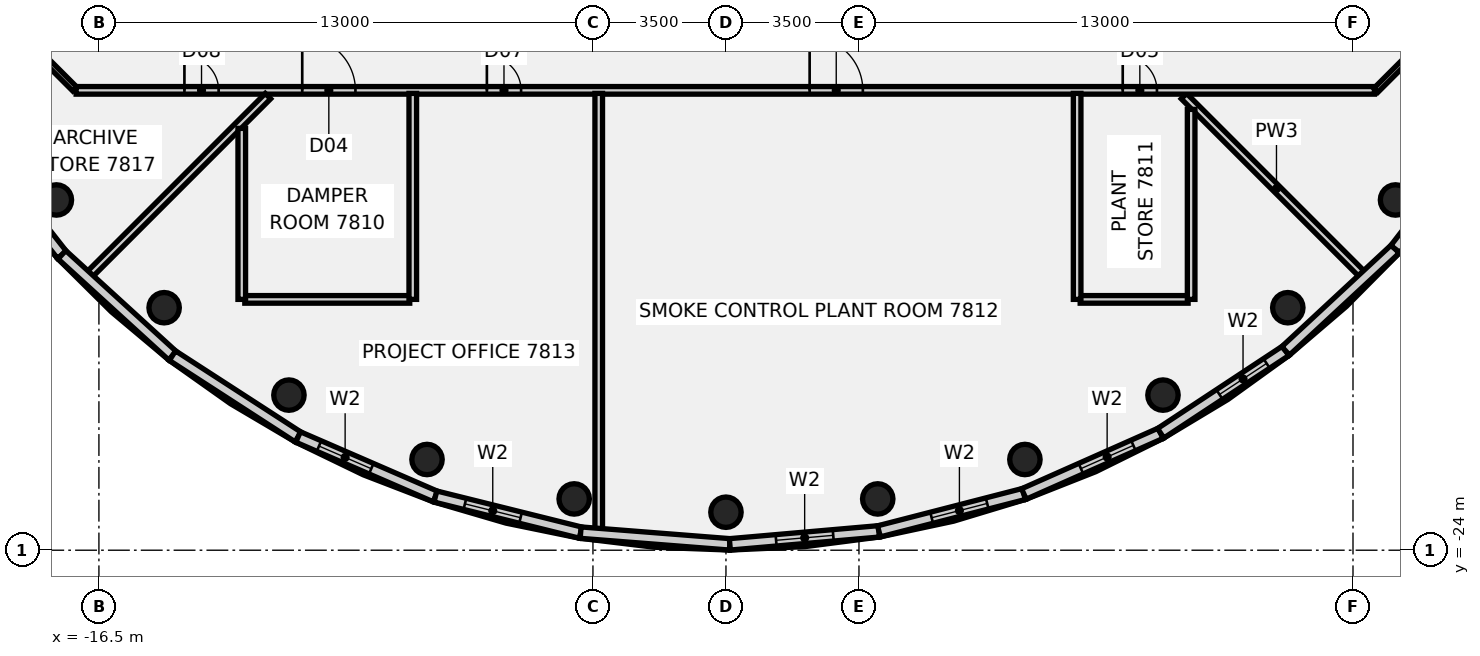
"""IFC4 building model, lengths in metres.
Left out: names, types, materials, properties, quantities, classifications, styles, units other than length and angle.
Written with IfcOpenShell. Run it as: python <this file> out.ifc"""

import sys

from ifc_helpers import new_model, si_unit, direction, frame, frame_2d, origin, origin_2d, place, context, subcontext, project, spatial, rectangle, circle, extrude, element, fill, save


model = new_model("IFC4")
c1 = context("Model", 3, precision=1e-05, world=origin(), true_north=direction((0.0, 1.0)))
c2 = subcontext(c1, "Body", "Model", "MODEL_VIEW")
j1 = project(units=[si_unit("LENGTHUNIT", "METRE"), si_unit("PLANEANGLEUNIT", "RADIAN")], contexts=[c1])
p1 = place(None, origin())
s1 = spatial("IfcSite", under=j1, at=p1, CompositionType="ELEMENT")
p2 = place(p1, origin())
s2 = spatial("IfcBuilding", under=s1, at=p2, CompositionType="ELEMENT")
p3 = place(p2, frame((0.0, 0.0, 317.4)))
s3 = spatial("IfcBuildingStorey", under=s2, at=p3, CompositionType="ELEMENT", Elevation=317.4)
for number, where, z_axis, x_axis in (
    (1, (-17.619, -14.784, -0.18), (0.0, 0.0, 1.0), (1.0, 0.0, 0.0)),
    (2, (-14.784, -17.619, -0.18), (0.0, 0.0, 1.0), (1.0, 0.0, 0.0)),
    (3, (-11.5, -19.919, -0.18), (0.0, 0.0, 1.0), (1.0, 0.0, 0.0)),
    (4, (-7.866, -21.613, -0.18), (0.0, 0.0, 1.0), (1.0, 0.0, 0.0)),
    (5, (-3.994, -22.651, -0.18), (0.0, 0.0, 1.0), (1.0, 0.0, 0.0)),
    (6, (0.0, -23.0, -0.18), (0.0, 0.0, 1.0), (1.0, 0.0, 0.0)),
    (7, (3.994, -22.651, -0.18), (0.0, 0.0, 1.0), (1.0, 0.0, 0.0)),
    (8, (7.866, -21.613, -0.18), (0.0, 0.0, 1.0), (1.0, 0.0, 0.0)),
    (9, (11.5, -19.919, -0.18), (0.0, 0.0, 1.0), (1.0, 0.0, 0.0)),
    (10, (14.784, -17.619, -0.18), (0.0, 0.0, 1.0), (1.0, 0.0, 0.0)),
    (11, (17.619, -14.784, -0.18), (0.0, 0.0, 1.0), (1.0, 0.0, 0.0)),
):
    element("IfcColumn", number, at=place(p3, frame(where, z_axis=z_axis, x_axis=x_axis)), inside=s3, PredefinedType="COLUMN", context=c2, shape_type="SweptSolid", body=[
        extrude(circle(Radius=0.4, at=origin_2d()), origin(), (0.0, 0.0, 1.0), 4.0),
    ])
p4 = place(p3, frame((-18.872, -10.128, 0.0), z_axis=(0.0, 0.0, 1.0), x_axis=(0.707106781187, -0.707106781187, 0.0)))
e12 = element("IfcWall", 12, at=p4, inside=s3, PredefinedType="PARTITIONING", context=c2, shape_type="SweptSolid", body=[
    extrude(rectangle(XDim=2.455, YDim=0.15, at=frame_2d((1.228, 0.0))), origin(), (0.0, 0.0, 1.0), 3.22),
])
p5 = place(p3, frame((12.052, -12.052, 0.0), z_axis=(0.0, 0.0, 1.0), x_axis=(0.707106781187, -0.707106781187, 0.0)))
e13 = element("IfcWall", 13, at=p5, inside=s3, PredefinedType="PARTITIONING", context=c2, shape_type="SweptSolid", body=[
    extrude(rectangle(XDim=6.886, YDim=0.2, at=frame_2d((3.443, 0.0))), origin(), (0.0, 0.0, 1.0), 3.22),
])
p6 = place(p3, frame((-17.1, -11.9, 0.0), z_axis=(0.0, 0.0, 1.0), x_axis=(1.0, 0.0, 0.0)))
e14 = element("IfcWall", 14, at=p6, inside=s3, PredefinedType="PARTITIONING", context=c2, shape_type="SweptSolid", body=[
    extrude(rectangle(XDim=34.165, YDim=0.2, at=frame_2d((17.083, 0.0))), origin(), (0.0, 0.0, 1.0), 3.22),
])
p7 = place(p6, frame((5.95, 0.0, 0.0)))
e15 = element("IfcOpeningElement", 15, at=p7, cuts=e14, PredefinedType="OPENING", context=c2, shape_type="SweptSolid", body=[
    extrude(rectangle(XDim=1.4, YDim=2.1, at=frame_2d((0.7, 1.05))), frame((0.0, 0.11, 0.0), z_axis=(0.0, -1.0, 0.0), x_axis=(1.0, 0.0, 0.0)), (0.0, 0.0, 1.0), 0.22),
])
p8 = place(p6, frame((27.541, 0.0, 0.0)))
e16 = element("IfcOpeningElement", 16, at=p8, cuts=e14, PredefinedType="OPENING", context=c2, shape_type="SweptSolid", body=[
    extrude(rectangle(XDim=0.9, YDim=2.1, at=frame_2d((0.45, 1.05))), frame((0.0, 0.11, 0.0), z_axis=(0.0, -1.0, 0.0), x_axis=(1.0, 0.0, 0.0)), (0.0, 0.0, 1.0), 0.22),
])
p9 = place(p6, frame((19.302, 0.0, 0.0)))
e17 = element("IfcOpeningElement", 17, at=p9, cuts=e14, PredefinedType="OPENING", context=c2, shape_type="SweptSolid", body=[
    extrude(rectangle(XDim=1.4, YDim=2.1, at=frame_2d((0.7, 1.05))), frame((0.0, 0.11, 0.0), z_axis=(0.0, -1.0, 0.0), x_axis=(1.0, 0.0, 0.0)), (0.0, 0.0, 1.0), 0.22),
])
p10 = place(p6, frame((10.809, 0.0, 0.0)))
e18 = element("IfcOpeningElement", 18, at=p10, cuts=e14, PredefinedType="OPENING", context=c2, shape_type="SweptSolid", body=[
    extrude(rectangle(XDim=0.9, YDim=2.1, at=frame_2d((0.45, 1.05))), frame((0.0, 0.11, 0.0), z_axis=(0.0, -1.0, 0.0), x_axis=(1.0, 0.0, 0.0)), (0.0, 0.0, 1.0), 0.22),
])
p11 = place(p6, frame((2.85, 0.0, 0.0)))
e19 = element("IfcOpeningElement", 19, at=p11, cuts=e14, PredefinedType="OPENING", context=c2, shape_type="SweptSolid", body=[
    extrude(rectangle(XDim=0.9, YDim=2.1, at=frame_2d((0.45, 1.05))), frame((0.0, 0.11, 0.0), z_axis=(0.0, -1.0, 0.0), x_axis=(1.0, 0.0, 0.0)), (0.0, 0.0, 1.0), 0.22),
])
p12 = place(p3, frame((-12.661, -17.4, 0.0), z_axis=(0.0, 0.0, 1.0), x_axis=(1.0, 0.0, 0.0)))
e20 = element("IfcWall", 20, at=p12, inside=s3, PredefinedType="PARTITIONING", context=c2, shape_type="SweptSolid", body=[
    extrude(rectangle(XDim=4.34, YDim=0.2, at=frame_2d((2.17, 0.0))), origin(), (0.0, 0.0, 1.0), 3.22),
])
p13 = place(p3, frame((9.321, -17.4, 0.0), z_axis=(0.0, 0.0, 1.0), x_axis=(1.0, 0.0, 0.0)))
e21 = element("IfcWall", 21, at=p13, inside=s3, PredefinedType="PARTITIONING", context=c2, shape_type="SweptSolid", body=[
    extrude(rectangle(XDim=2.84, YDim=0.2, at=frame_2d((1.42, 0.0))), origin(), (0.0, 0.0, 1.0), 3.22),
])
p14 = place(p3, frame((-16.927, -16.927, 0.0), z_axis=(0.0, 0.0, 1.0), x_axis=(0.707106781187, 0.707106781187, 0.0)))
e22 = element("IfcWall", 22, at=p14, inside=s3, PredefinedType="PARTITIONING", context=c2, shape_type="SweptSolid", body=[
    extrude(rectangle(XDim=6.894, YDim=0.2, at=frame_2d((3.447, 0.0))), origin(), (0.0, 0.0, 1.0), 3.22),
])
p15 = place(p3, frame((17.1, -11.9, 0.0), z_axis=(0.0, 0.0, 1.0), x_axis=(0.707106781187, 0.707106781187, 0.0)))
e23 = element("IfcWall", 23, at=p15, inside=s3, PredefinedType="PARTITIONING", context=c2, shape_type="SweptSolid", body=[
    extrude(rectangle(XDim=2.505, YDim=0.15, at=frame_2d((1.253, 0.0))), origin(), (0.0, 0.0, 1.0), 3.22),
])
p16 = place(p3, frame((-12.741, -17.4, 0.0), z_axis=(0.0, 0.0, 1.0), x_axis=(0.0, 1.0, 0.0)))
e24 = element("IfcWall", 24, at=p16, inside=s3, PredefinedType="PARTITIONING", context=c2, shape_type="SweptSolid", body=[
    extrude(rectangle(XDim=4.499, YDim=0.2, at=frame_2d((2.25, 0.0))), origin(), (0.0, 0.0, 1.0), 3.22),
])
p17 = place(p3, frame((-8.241, -17.4, 0.0), z_axis=(0.0, 0.0, 1.0), x_axis=(0.0, 1.0, 0.0)))
e25 = element("IfcWall", 25, at=p17, inside=s3, PredefinedType="PARTITIONING", context=c2, shape_type="SweptSolid", body=[
    extrude(rectangle(XDim=5.42, YDim=0.2, at=frame_2d((2.71, 0.0))), origin(), (0.0, 0.0, 1.0), 3.22),
])
p18 = place(p3, frame((-3.348, -23.724, 0.0), z_axis=(0.0, 0.0, 1.0), x_axis=(0.0, 1.0, 0.0)))
e26 = element("IfcWall", 26, at=p18, inside=s3, PredefinedType="PARTITIONING", context=c2, shape_type="SweptSolid", body=[
    extrude(rectangle(XDim=11.744, YDim=0.2, at=frame_2d((5.872, 0.0))), origin(), (0.0, 0.0, 1.0), 3.22),
])
p19 = place(p3, frame((9.241, -17.4, 0.0), z_axis=(0.0, 0.0, 1.0), x_axis=(0.0, 1.0, 0.0)))
e27 = element("IfcWall", 27, at=p19, inside=s3, PredefinedType="PARTITIONING", context=c2, shape_type="SweptSolid", body=[
    extrude(rectangle(XDim=5.42, YDim=0.2, at=frame_2d((2.71, 0.0))), origin(), (0.0, 0.0, 1.0), 3.22),
])
p20 = place(p3, frame((12.241, -17.4, 0.0), z_axis=(0.0, 0.0, 1.0), x_axis=(0.0, 1.0, 0.0)))
e28 = element("IfcWall", 28, at=p20, inside=s3, PredefinedType="PARTITIONING", context=c2, shape_type="SweptSolid", body=[
    extrude(rectangle(XDim=4.999, YDim=0.2, at=frame_2d((2.5, 0.0))), origin(), (0.0, 0.0, 1.0), 3.22),
])
p21 = place(p3, frame((-19.906, -13.128, 0.0), z_axis=(0.0, 0.0, 1.0), x_axis=(0.617577851206, -0.786509756901, 0.0)))
e29 = element("IfcWall", 29, at=p21, inside=s3, PredefinedType="SOLIDWALL", context=c2, shape_type="SweptSolid", body=[
    extrude(rectangle(XDim=3.938, YDim=0.3, at=frame_2d((1.969, 0.0))), origin(), (0.0, 0.0, 1.0), 3.82),
])
p22 = place(p3, frame((-17.474, -16.226, 0.0), z_axis=(0.0, 0.0, 1.0), x_axis=(0.738634435884, -0.674106200926, 0.0)))
e30 = element("IfcWall", 30, at=p22, inside=s3, PredefinedType="SOLIDWALL", context=c2, shape_type="SweptSolid", body=[
    extrude(rectangle(XDim=3.938, YDim=0.3, at=frame_2d((1.969, 0.0))), origin(), (0.0, 0.0, 1.0), 3.82),
])
p23 = place(p3, frame((-14.565, -18.881, 0.0), z_axis=(0.0, 0.0, 1.0), x_axis=(0.839498632024, -0.54336180104, 0.0)))
e31 = element("IfcWall", 31, at=p23, inside=s3, PredefinedType="SOLIDWALL", context=c2, shape_type="SweptSolid", body=[
    extrude(rectangle(XDim=3.938, YDim=0.3, at=frame_2d((1.969, 0.0))), origin(), (0.0, 0.0, 1.0), 3.82),
])
p24 = place(p3, frame((-11.259, -21.021, 0.0), z_axis=(0.0, 0.0, 1.0), x_axis=(0.917505110173, -0.397723990735, 0.0)))
e32 = element("IfcWall", 32, at=p24, inside=s3, PredefinedType="SOLIDWALL", context=c2, shape_type="SweptSolid", body=[
    extrude(rectangle(XDim=3.938, YDim=0.3, at=frame_2d((1.969, 0.0))), origin(), (0.0, 0.0, 1.0), 3.82),
])
p25 = place(p24, frame((0.6, 0.0, 1.4)))
e33 = element("IfcOpeningElement", 33, at=p25, cuts=e32, PredefinedType="OPENING", context=c2, shape_type="SweptSolid", body=[
    extrude(rectangle(XDim=1.498, YDim=2.12, at=frame_2d((0.749, 1.06))), frame((0.0, 0.16, 0.0), z_axis=(0.0, -1.0, 0.0), x_axis=(1.0, 0.0, 0.0)), (0.0, 0.0, 1.0), 0.32),
])
p26 = place(p3, frame((-7.646, -22.587, 0.0), z_axis=(0.0, 0.0, 1.0), x_axis=(0.970440788586, -0.241339337547, 0.0)))
e34 = element("IfcWall", 34, at=p26, inside=s3, PredefinedType="SOLIDWALL", context=c2, shape_type="SweptSolid", body=[
    extrude(rectangle(XDim=3.938, YDim=0.3, at=frame_2d((1.969, 0.0))), origin(), (0.0, 0.0, 1.0), 3.82),
])
p27 = place(p26, frame((0.801, 0.0, 1.4)))
e35 = element("IfcOpeningElement", 35, at=p27, cuts=e34, PredefinedType="OPENING", context=c2, shape_type="SweptSolid", body=[
    extrude(rectangle(XDim=1.509, YDim=2.12, at=frame_2d((0.754, 1.06))), frame((0.0, 0.16, 0.0), z_axis=(0.0, -1.0, 0.0), x_axis=(1.0, 0.0, 0.0)), (0.0, 0.0, 1.0), 0.32),
])
p28 = place(p3, frame((-3.824, -23.537, 0.0), z_axis=(0.0, 0.0, 1.0), x_axis=(0.996930318741, -0.078293930641, 0.0)))
e36 = element("IfcWall", 36, at=p28, inside=s3, PredefinedType="SOLIDWALL", context=c2, shape_type="SweptSolid", body=[
    extrude(rectangle(XDim=3.938, YDim=0.3, at=frame_2d((1.969, 0.0))), origin(), (0.0, 0.0, 1.0), 3.82),
])
p29 = place(p3, frame((0.103, -23.846, 0.0), z_axis=(0.0, 0.0, 1.0), x_axis=(0.99621635874, 0.08690780505, 0.0)))
e37 = element("IfcWall", 37, at=p29, inside=s3, PredefinedType="SOLIDWALL", context=c2, shape_type="SweptSolid", body=[
    extrude(rectangle(XDim=3.938, YDim=0.3, at=frame_2d((1.969, 0.0))), origin(), (0.0, 0.0, 1.0), 3.82),
])
p30 = place(p29, frame((1.221, 0.0, 1.4)))
e38 = element("IfcOpeningElement", 38, at=p30, cuts=e37, PredefinedType="OPENING", context=c2, shape_type="SweptSolid", body=[
    extrude(rectangle(XDim=1.509, YDim=2.12, at=frame_2d((0.755, 1.06))), frame((0.0, 0.16, 0.0), z_axis=(0.0, -1.0, 0.0), x_axis=(1.0, 0.0, 0.0)), (0.0, 0.0, 1.0), 0.32),
])
p31 = place(p3, frame((4.026, -23.503, 0.0), z_axis=(0.0, 0.0, 1.0), x_axis=(0.968336809904, 0.24964739651, 0.0)))
e39 = element("IfcWall", 39, at=p31, inside=s3, PredefinedType="SOLIDWALL", context=c2, shape_type="SweptSolid", body=[
    extrude(rectangle(XDim=3.938, YDim=0.3, at=frame_2d((1.969, 0.0))), origin(), (0.0, 0.0, 1.0), 3.82),
])
p32 = place(p31, frame((1.432, 0.0, 1.4)))
e40 = element("IfcOpeningElement", 40, at=p32, cuts=e39, PredefinedType="OPENING", context=c2, shape_type="SweptSolid", body=[
    extrude(rectangle(XDim=1.509, YDim=2.12, at=frame_2d((0.754, 1.06))), frame((0.0, 0.16, 0.0), z_axis=(0.0, -1.0, 0.0), x_axis=(1.0, 0.0, 0.0)), (0.0, 0.0, 1.0), 0.32),
])
p33 = place(p3, frame((7.84, -22.52, 0.0), z_axis=(0.0, 0.0, 1.0), x_axis=(0.91404912862, 0.405603489221, 0.0)))
e41 = element("IfcWall", 41, at=p33, inside=s3, PredefinedType="SOLIDWALL", context=c2, shape_type="SweptSolid", body=[
    extrude(rectangle(XDim=3.938, YDim=0.3, at=frame_2d((1.969, 0.0))), origin(), (0.0, 0.0, 1.0), 3.82),
])
p34 = place(p33, frame((1.643, 0.0, 1.4)))
e42 = element("IfcOpeningElement", 42, at=p34, cuts=e41, PredefinedType="OPENING", context=c2, shape_type="SweptSolid", body=[
    extrude(rectangle(XDim=1.509, YDim=2.12, at=frame_2d((0.754, 1.06))), frame((0.0, 0.16, 0.0), z_axis=(0.0, -1.0, 0.0), x_axis=(1.0, 0.0, 0.0)), (0.0, 0.0, 1.0), 0.32),
])
p35 = place(p3, frame((11.439, -20.923, 0.0), z_axis=(0.0, 0.0, 1.0), x_axis=(0.834786621205, 0.550573607302, 0.0)))
e43 = element("IfcWall", 43, at=p35, inside=s3, PredefinedType="SOLIDWALL", context=c2, shape_type="SweptSolid", body=[
    extrude(rectangle(XDim=3.938, YDim=0.3, at=frame_2d((1.969, 0.0))), origin(), (0.0, 0.0, 1.0), 3.82),
])
p36 = place(p35, frame((1.853, 0.0, 1.4)))
e44 = element("IfcOpeningElement", 44, at=p36, cuts=e43, PredefinedType="OPENING", context=c2, shape_type="SweptSolid", body=[
    extrude(rectangle(XDim=1.485, YDim=2.12, at=frame_2d((0.743, 1.06))), frame((0.0, 0.16, 0.0), z_axis=(0.0, -1.0, 0.0), x_axis=(1.0, 0.0, 0.0)), (0.0, 0.0, 1.0), 0.32),
])
p37 = place(p3, frame((14.727, -18.754, 0.0), z_axis=(0.0, 0.0, 1.0), x_axis=(0.732813362883, 0.680429698926, 0.0)))
e45 = element("IfcWall", 45, at=p37, inside=s3, PredefinedType="SOLIDWALL", context=c2, shape_type="SweptSolid", body=[
    extrude(rectangle(XDim=3.938, YDim=0.3, at=frame_2d((1.969, 0.0))), origin(), (0.0, 0.0, 1.0), 3.82),
])
p38 = place(p3, frame((17.613, -16.075, 0.0), z_axis=(0.0, 0.0, 1.0), x_axis=(0.610785688376, 0.79179596038, 0.0)))
e46 = element("IfcWall", 46, at=p38, inside=s3, PredefinedType="SOLIDWALL", context=c2, shape_type="SweptSolid", body=[
    extrude(rectangle(XDim=3.938, YDim=0.3, at=frame_2d((1.969, 0.0))), origin(), (0.0, 0.0, 1.0), 3.82),
])
p39 = place(p7, frame((1.4, 0.0, 0.0), z_axis=(0.0, 0.0, 1.0), x_axis=(-1.0, 0.0, 0.0)))
e47 = element("IfcDoor", 47, at=p39, inside=s3, OperationType="DOUBLE_DOOR_SINGLE_SWING", PredefinedType="DOOR", context=c2, shape_type="SweptSolid", body=[
    extrude(rectangle(XDim=1.4, YDim=2.1, at=frame_2d((0.7, 1.05))), frame((0.0, 0.025, 0.0), z_axis=(0.0, -1.0, 0.0), x_axis=(1.0, 0.0, 0.0)), (0.0, 0.0, 1.0), 0.05),
])
fill(e15, e47)
p40 = place(p8, frame((0.9, 0.0, 0.0), z_axis=(0.0, 0.0, 1.0), x_axis=(-1.0, 0.0, 0.0)))
e48 = element("IfcDoor", 48, at=p40, inside=s3, OperationType="SINGLE_SWING_RIGHT", PredefinedType="DOOR", context=c2, shape_type="SweptSolid", body=[
    extrude(rectangle(XDim=0.9, YDim=2.1, at=frame_2d((0.45, 1.05))), frame((0.0, 0.025, 0.0), z_axis=(0.0, -1.0, 0.0), x_axis=(1.0, 0.0, 0.0)), (0.0, 0.0, 1.0), 0.05),
])
fill(e16, e48)
p41 = place(p9, frame((1.4, 0.0, 0.0), z_axis=(0.0, 0.0, 1.0), x_axis=(-1.0, 0.0, 0.0)))
e49 = element("IfcDoor", 49, at=p41, inside=s3, OperationType="DOUBLE_DOOR_SINGLE_SWING", PredefinedType="DOOR", context=c2, shape_type="SweptSolid", body=[
    extrude(rectangle(XDim=1.4, YDim=2.1, at=frame_2d((0.7, 1.05))), frame((0.0, 0.025, 0.0), z_axis=(0.0, -1.0, 0.0), x_axis=(1.0, 0.0, 0.0)), (0.0, 0.0, 1.0), 0.05),
])
fill(e17, e49)
p42 = place(p10, frame((0.9, 0.0, 0.0), z_axis=(0.0, 0.0, 1.0), x_axis=(-1.0, 0.0, 0.0)))
e50 = element("IfcDoor", 50, at=p42, inside=s3, OperationType="SINGLE_SWING_LEFT", PredefinedType="DOOR", context=c2, shape_type="SweptSolid", body=[
    extrude(rectangle(XDim=0.9, YDim=2.1, at=frame_2d((0.45, 1.05))), frame((0.0, 0.025, 0.0), z_axis=(0.0, -1.0, 0.0), x_axis=(1.0, 0.0, 0.0)), (0.0, 0.0, 1.0), 0.05),
])
fill(e18, e50)
p43 = place(p11, frame((0.9, 0.0, 0.0), z_axis=(0.0, 0.0, 1.0), x_axis=(-1.0, 0.0, 0.0)))
e51 = element("IfcDoor", 51, at=p43, inside=s3, OperationType="SINGLE_SWING_LEFT", PredefinedType="DOOR", context=c2, shape_type="SweptSolid", body=[
    extrude(rectangle(XDim=0.9, YDim=2.1, at=frame_2d((0.45, 1.05))), frame((0.0, 0.025, 0.0), z_axis=(0.0, -1.0, 0.0), x_axis=(1.0, 0.0, 0.0)), (0.0, 0.0, 1.0), 0.05),
])
fill(e19, e51)
p44 = place(p25, origin())
e52 = element("IfcWindow", 52, at=p44, inside=s3, PartitioningType="SINGLE_PANEL", PredefinedType="WINDOW", context=c2, shape_type="SweptSolid", body=[
    extrude(rectangle(XDim=1.498, YDim=2.12, at=frame_2d((0.749, 1.06))), frame((0.0, 0.03, 0.0), z_axis=(0.0, -1.0, 0.0), x_axis=(1.0, 0.0, 0.0)), (0.0, 0.0, 1.0), 0.06),
])
fill(e33, e52)
p45 = place(p27, origin())
e53 = element("IfcWindow", 53, at=p45, inside=s3, PartitioningType="SINGLE_PANEL", PredefinedType="WINDOW", context=c2, shape_type="SweptSolid", body=[
    extrude(rectangle(XDim=1.509, YDim=2.12, at=frame_2d((0.754, 1.06))), frame((0.0, 0.03, 0.0), z_axis=(0.0, -1.0, 0.0), x_axis=(1.0, 0.0, 0.0)), (0.0, 0.0, 1.0), 0.06),
])
fill(e35, e53)
p46 = place(p30, origin())
e54 = element("IfcWindow", 54, at=p46, inside=s3, PartitioningType="SINGLE_PANEL", PredefinedType="WINDOW", context=c2, shape_type="SweptSolid", body=[
    extrude(rectangle(XDim=1.509, YDim=2.12, at=frame_2d((0.755, 1.06))), frame((0.0, 0.03, 0.0), z_axis=(0.0, -1.0, 0.0), x_axis=(1.0, 0.0, 0.0)), (0.0, 0.0, 1.0), 0.06),
])
fill(e38, e54)
p47 = place(p32, origin())
e55 = element("IfcWindow", 55, at=p47, inside=s3, PartitioningType="SINGLE_PANEL", PredefinedType="WINDOW", context=c2, shape_type="SweptSolid", body=[
    extrude(rectangle(XDim=1.509, YDim=2.12, at=frame_2d((0.754, 1.06))), frame((0.0, 0.03, 0.0), z_axis=(0.0, -1.0, 0.0), x_axis=(1.0, 0.0, 0.0)), (0.0, 0.0, 1.0), 0.06),
])
fill(e40, e55)
p48 = place(p34, origin())
e56 = element("IfcWindow", 56, at=p48, inside=s3, PartitioningType="SINGLE_PANEL", PredefinedType="WINDOW", context=c2, shape_type="SweptSolid", body=[
    extrude(rectangle(XDim=1.509, YDim=2.12, at=frame_2d((0.754, 1.06))), frame((0.0, 0.03, 0.0), z_axis=(0.0, -1.0, 0.0), x_axis=(1.0, 0.0, 0.0)), (0.0, 0.0, 1.0), 0.06),
])
fill(e42, e56)
p49 = place(p36, origin())
e57 = element("IfcWindow", 57, at=p49, inside=s3, PartitioningType="SINGLE_PANEL", PredefinedType="WINDOW", context=c2, shape_type="SweptSolid", body=[
    extrude(rectangle(XDim=1.485, YDim=2.12, at=frame_2d((0.743, 1.06))), frame((0.0, 0.03, 0.0), z_axis=(0.0, -1.0, 0.0), x_axis=(1.0, 0.0, 0.0)), (0.0, 0.0, 1.0), 0.06),
])
fill(e44, e57)
save(model, sys.argv[1])
